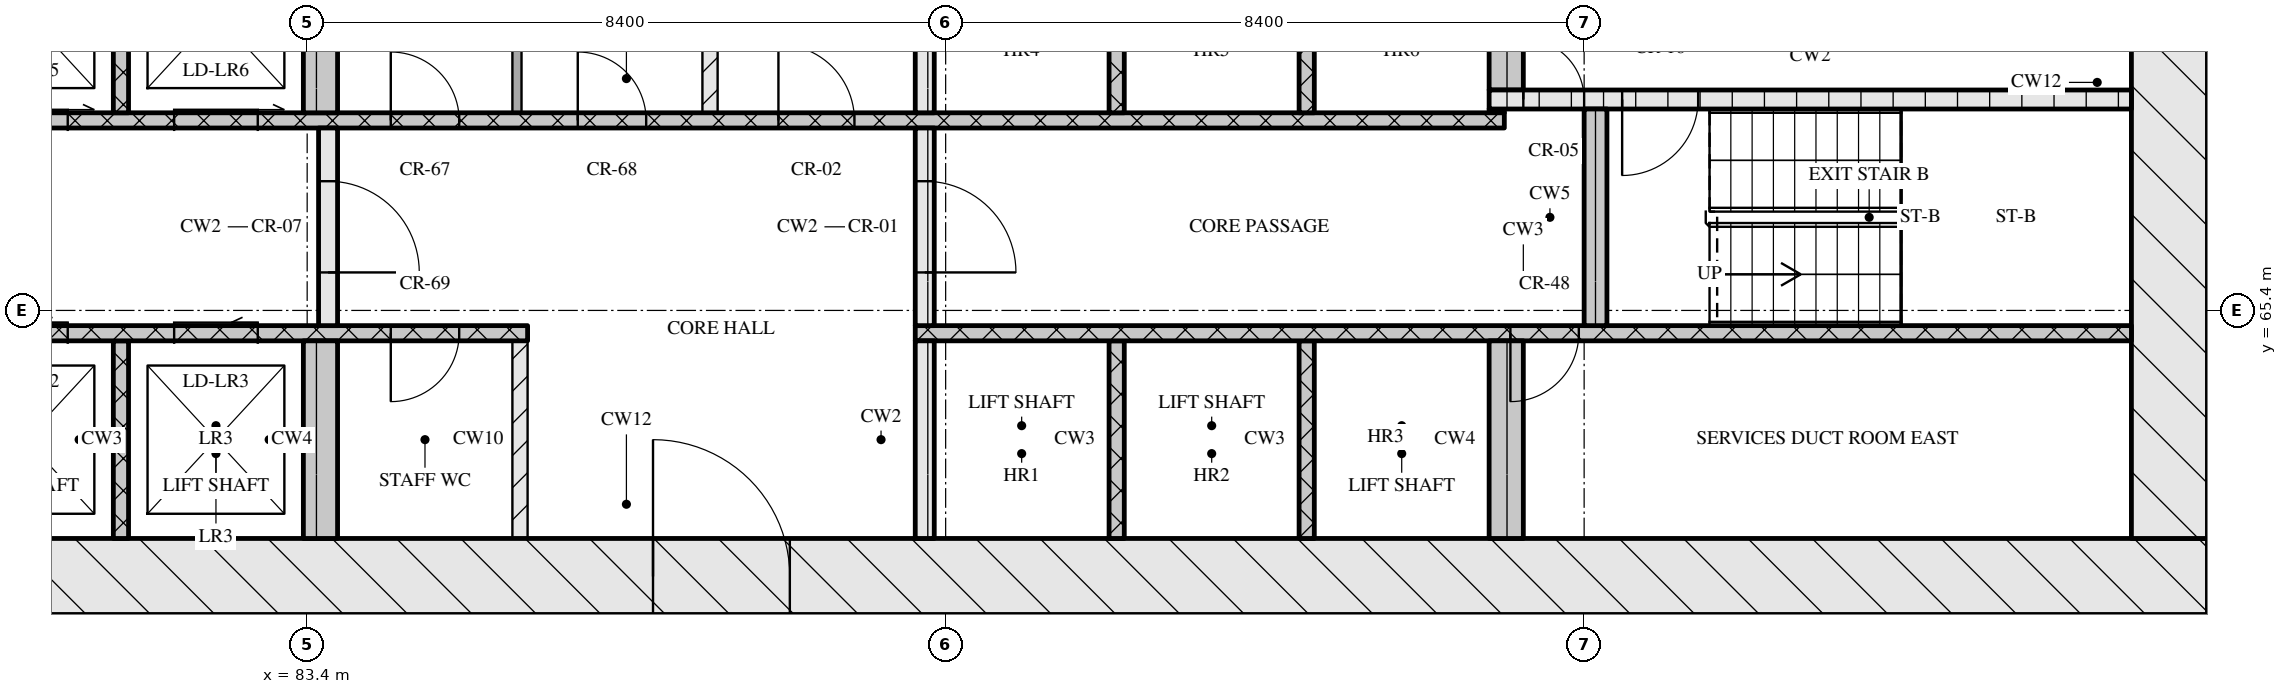
"""IFC4 building model, lengths in metres.
Left out: names, types, materials, properties, quantities, classifications, styles, units other than length and angle.
Written with IfcOpenShell. Run it as: python <this file> out.ifc"""

import sys

from ifc_helpers import new_model, si_unit, direction, frame, frame_2d, origin, place, context, subcontext, project, spatial, rectangle, extrude, element, fill, save


model = new_model("IFC4")
c1 = context("Model", 3, precision=1e-05, world=origin(), true_north=direction((0.0, 1.0)))
c2 = subcontext(c1, "Body", "Model", "MODEL_VIEW")
j1 = project(units=[si_unit("LENGTHUNIT", "METRE"), si_unit("PLANEANGLEUNIT", "RADIAN")], contexts=[c1])
p1 = place(None, origin())
s1 = spatial("IfcSite", under=j1, at=p1, CompositionType="ELEMENT")
p2 = place(p1, origin())
s2 = spatial("IfcBuilding", under=s1, at=p2, CompositionType="ELEMENT")
p3 = place(p2, frame((0.0, 0.0, 124.05)))
s3 = spatial("IfcBuildingStorey", under=s2, at=p3, CompositionType="ELEMENT", Elevation=124.05)
p4 = place(p3, frame((66.8, 61.9, 0.0), z_axis=(0.0, 0.0, 1.0), x_axis=(1.0, 0.0, 0.0)))
e1 = element("IfcWall", 1, at=p4, inside=s3, PredefinedType="SOLIDWALL", context=c2, shape_type="SweptSolid", body=[
    extrude(rectangle(XDim=41.6, YDim=1.0, at=frame_2d((20.8, 0.0))), origin(), (0.0, 0.0, 1.0), 3.32),
])
p5 = place(p4, frame((21.15, 0.0, 0.0)))
e2 = element("IfcOpeningElement", 2, at=p5, cuts=e1, PredefinedType="OPENING", context=c2, shape_type="SweptSolid", body=[
    extrude(rectangle(XDim=1.8, YDim=2.1, at=frame_2d((0.9, 1.05))), frame((0.0, 0.51, 0.0), z_axis=(0.0, -1.0, 0.0), x_axis=(1.0, 0.0, 0.0)), (0.0, 0.0, 1.0), 1.02),
])
p6 = place(p3, frame((107.9, 62.4, 0.0), z_axis=(0.0, 0.0, 1.0), x_axis=(0.0, 1.0, 0.0)))
e3 = element("IfcWall", 3, at=p6, inside=s3, PredefinedType="SOLIDWALL", context=c2, shape_type="SweptSolid", body=[
    extrude(rectangle(XDim=12.0, YDim=1.0, at=frame_2d((6.0, 0.0))), origin(), (0.0, 0.0, 1.0), 3.32),
])
p7 = place(p6, frame((6.45, 0.0, 0.0)))
e4 = element("IfcOpeningElement", 4, at=p7, cuts=e3, PredefinedType="OPENING", context=c2, shape_type="SweptSolid", body=[
    extrude(rectangle(XDim=1.2, YDim=2.1, at=frame_2d((0.6, 1.05))), frame((0.0, 0.51, 0.0), z_axis=(0.0, -1.0, 0.0), x_axis=(1.0, 0.0, 0.0)), (0.0, 0.0, 1.0), 1.02),
])
p8 = place(p3, frame((80.95, 62.4, 0.0), z_axis=(0.0, 0.0, 1.0), x_axis=(0.0, 1.0, 0.0)))
e5 = element("IfcWall", 5, at=p8, inside=s3, PredefinedType="SOLIDWALL", context=c2, shape_type="SweptSolid", body=[
    extrude(rectangle(XDim=2.6, YDim=0.2, at=frame_2d((1.3, 0.0))), origin(), (0.0, 0.0, 1.0), 3.32),
])
p9 = place(p3, frame((83.575, 62.4, 0.0), z_axis=(0.0, 0.0, 1.0), x_axis=(0.0, 1.0, 0.0)))
e6 = element("IfcWall", 6, at=p9, inside=s3, PredefinedType="SOLIDWALL", context=c2, shape_type="SweptSolid", body=[
    extrude(rectangle(XDim=2.6, YDim=0.45, at=frame_2d((1.3, 0.0))), origin(), (0.0, 0.0, 1.0), 3.32),
])
p10 = place(p3, frame((86.2, 62.4, 0.0), z_axis=(0.0, 0.0, 1.0), x_axis=(0.0, 1.0, 0.0)))
e7 = element("IfcWall", 7, at=p10, inside=s3, PredefinedType="PARTITIONING", context=c2, shape_type="SweptSolid", body=[
    extrude(rectangle(XDim=2.6, YDim=0.2, at=frame_2d((1.3, 0.0))), origin(), (0.0, 0.0, 1.0), 3.32),
])
p11 = place(p3, frame((91.525, 62.4, 0.0), z_axis=(0.0, 0.0, 1.0), x_axis=(0.0, 1.0, 0.0)))
e8 = element("IfcWall", 8, at=p11, inside=s3, PredefinedType="SOLIDWALL", context=c2, shape_type="SweptSolid", body=[
    extrude(rectangle(XDim=2.6, YDim=0.25, at=frame_2d((1.3, 0.0))), origin(), (0.0, 0.0, 1.0), 3.32),
])
for number, where, z_axis, x_axis in (
    (9, (94.05, 62.4, 0.0), (0.0, 0.0, 1.0), (0.0, 1.0, 0.0)),
    (10, (96.55, 62.4, 0.0), (0.0, 0.0, 1.0), (0.0, 1.0, 0.0)),
):
    element("IfcWall", number, at=place(p3, frame(where, z_axis=z_axis, x_axis=x_axis)), inside=s3, PredefinedType="SOLIDWALL", context=c2, shape_type="SweptSolid", body=[
        extrude(rectangle(XDim=2.6, YDim=0.2, at=frame_2d((1.3, 0.0))), origin(), (0.0, 0.0, 1.0), 3.32),
    ])
p12 = place(p3, frame((99.175, 62.4, 0.0), z_axis=(0.0, 0.0, 1.0), x_axis=(0.0, 1.0, 0.0)))
e11 = element("IfcWall", 11, at=p12, inside=s3, PredefinedType="SOLIDWALL", context=c2, shape_type="SweptSolid", body=[
    extrude(rectangle(XDim=2.6, YDim=0.45, at=frame_2d((1.3, 0.0))), origin(), (0.0, 0.0, 1.0), 3.32),
])
p13 = place(p3, frame((67.8, 65.1, 0.0), z_axis=(0.0, 0.0, 1.0), x_axis=(1.0, 0.0, 0.0)))
e12 = element("IfcWall", 12, at=p13, inside=s3, PredefinedType="SOLIDWALL", context=c2, shape_type="SweptSolid", body=[
    extrude(rectangle(XDim=18.5, YDim=0.2, at=frame_2d((9.25, 0.0))), origin(), (0.0, 0.0, 1.0), 3.32),
])
p14 = place(p13, frame((7.27, 0.0, 0.0)))
e13 = element("IfcOpeningElement", 13, at=p14, cuts=e12, PredefinedType="OPENING", context=c2, shape_type="SweptSolid", body=[
    extrude(rectangle(XDim=0.9, YDim=2.1, at=frame_2d((0.45, 1.05))), frame((0.0, 0.11, 0.0), z_axis=(0.0, -1.0, 0.0), x_axis=(1.0, 0.0, 0.0)), (0.0, 0.0, 1.0), 0.22),
])
p15 = place(p13, frame((8.85, 0.0, 0.0)))
e14 = element("IfcOpeningElement", 14, at=p15, cuts=e12, PredefinedType="OPENING", context=c2, shape_type="SweptSolid", body=[
    extrude(rectangle(XDim=1.1, YDim=2.1, at=frame_2d((0.55, 1.05))), frame((0.0, 0.11, 0.0), z_axis=(0.0, -1.0, 0.0), x_axis=(1.0, 0.0, 0.0)), (0.0, 0.0, 1.0), 0.22),
])
p16 = place(p13, frame((11.35, 0.0, 0.0)))
e15 = element("IfcOpeningElement", 15, at=p16, cuts=e12, PredefinedType="OPENING", context=c2, shape_type="SweptSolid", body=[
    extrude(rectangle(XDim=1.1, YDim=2.1, at=frame_2d((0.55, 1.05))), frame((0.0, 0.11, 0.0), z_axis=(0.0, -1.0, 0.0), x_axis=(1.0, 0.0, 0.0)), (0.0, 0.0, 1.0), 0.22),
])
p17 = place(p13, frame((13.85, 0.0, 0.0)))
e16 = element("IfcOpeningElement", 16, at=p17, cuts=e12, PredefinedType="OPENING", context=c2, shape_type="SweptSolid", body=[
    extrude(rectangle(XDim=1.1, YDim=2.1, at=frame_2d((0.55, 1.05))), frame((0.0, 0.11, 0.0), z_axis=(0.0, -1.0, 0.0), x_axis=(1.0, 0.0, 0.0)), (0.0, 0.0, 1.0), 0.22),
])
p18 = place(p13, frame((16.7, 0.0, 0.0)))
e17 = element("IfcOpeningElement", 17, at=p18, cuts=e12, PredefinedType="OPENING", context=c2, shape_type="SweptSolid", body=[
    extrude(rectangle(XDim=0.9, YDim=2.1, at=frame_2d((0.45, 1.05))), frame((0.0, 0.11, 0.0), z_axis=(0.0, -1.0, 0.0), x_axis=(1.0, 0.0, 0.0)), (0.0, 0.0, 1.0), 0.22),
])
p19 = place(p3, frame((91.4, 65.1, 0.0), z_axis=(0.0, 0.0, 1.0), x_axis=(1.0, 0.0, 0.0)))
e18 = element("IfcWall", 18, at=p19, inside=s3, PredefinedType="SOLIDWALL", context=c2, shape_type="SweptSolid", body=[
    extrude(rectangle(XDim=16.0, YDim=0.2, at=frame_2d((8.0, 0.0))), origin(), (0.0, 0.0, 1.0), 3.32),
])
p20 = place(p19, frame((7.83, 0.0, 0.0)))
e19 = element("IfcOpeningElement", 19, at=p20, cuts=e18, PredefinedType="OPENING", context=c2, shape_type="SweptSolid", body=[
    extrude(rectangle(XDim=0.9, YDim=2.1, at=frame_2d((0.45, 1.05))), frame((0.0, 0.11, 0.0), z_axis=(0.0, -1.0, 0.0), x_axis=(1.0, 0.0, 0.0)), (0.0, 0.0, 1.0), 0.22),
])
p21 = place(p3, frame((83.675, 65.2, 0.0), z_axis=(0.0, 0.0, 1.0), x_axis=(0.0, 1.0, 0.0)))
e20 = element("IfcWall", 20, at=p21, inside=s3, PredefinedType="SOLIDWALL", context=c2, shape_type="SweptSolid", body=[
    extrude(rectangle(XDim=2.6, YDim=0.25, at=frame_2d((1.3, 0.0))), origin(), (0.0, 0.0, 1.0), 3.32),
])
p22 = place(p21, frame((0.7, 0.0, 0.0)))
e21 = element("IfcOpeningElement", 21, at=p22, cuts=e20, PredefinedType="OPENING", context=c2, shape_type="SweptSolid", body=[
    extrude(rectangle(XDim=1.2, YDim=2.1, at=frame_2d((0.6, 1.05))), frame((0.0, 0.135, 0.0), z_axis=(0.0, -1.0, 0.0), x_axis=(1.0, 0.0, 0.0)), (0.0, 0.0, 1.0), 0.27),
])
p23 = place(p3, frame((91.525, 65.2, 0.0), z_axis=(0.0, 0.0, 1.0), x_axis=(0.0, 1.0, 0.0)))
e22 = element("IfcWall", 22, at=p23, inside=s3, PredefinedType="SOLIDWALL", context=c2, shape_type="SweptSolid", body=[
    extrude(rectangle(XDim=2.6, YDim=0.25, at=frame_2d((1.3, 0.0))), origin(), (0.0, 0.0, 1.0), 3.32),
])
p24 = place(p23, frame((0.7, 0.0, 0.0)))
e23 = element("IfcOpeningElement", 23, at=p24, cuts=e22, PredefinedType="OPENING", context=c2, shape_type="SweptSolid", body=[
    extrude(rectangle(XDim=1.2, YDim=2.1, at=frame_2d((0.6, 1.05))), frame((0.0, 0.135, 0.0), z_axis=(0.0, -1.0, 0.0), x_axis=(1.0, 0.0, 0.0)), (0.0, 0.0, 1.0), 0.27),
])
p25 = place(p3, frame((100.35, 65.2, 0.0), z_axis=(0.0, 0.0, 1.0), x_axis=(0.0, 1.0, 0.0)))
e24 = element("IfcWall", 24, at=p25, inside=s3, PredefinedType="SOLIDWALL", context=c2, shape_type="SweptSolid", body=[
    extrude(rectangle(XDim=2.85, YDim=0.3, at=frame_2d((1.425, 0.0))), origin(), (0.0, 0.0, 1.0), 3.32),
])
p26 = place(p3, frame((76.05, 67.9, 0.0), z_axis=(0.0, 0.0, 1.0), x_axis=(1.0, 0.0, 0.0)))
e25 = element("IfcWall", 25, at=p26, inside=s3, PredefinedType="SOLIDWALL", context=c2, shape_type="SweptSolid", body=[
    extrude(rectangle(XDim=23.1, YDim=0.2, at=frame_2d((11.55, 0.0))), origin(), (0.0, 0.0, 1.0), 3.32),
])
p27 = place(p26, frame((0.6, 0.0, 0.0)))
e26 = element("IfcOpeningElement", 26, at=p27, cuts=e25, PredefinedType="OPENING", context=c2, shape_type="SweptSolid", body=[
    extrude(rectangle(XDim=1.1, YDim=2.1, at=frame_2d((0.55, 1.05))), frame((0.0, 0.11, 0.0), z_axis=(0.0, -1.0, 0.0), x_axis=(1.0, 0.0, 0.0)), (0.0, 0.0, 1.0), 0.22),
])
p28 = place(p26, frame((3.1, 0.0, 0.0)))
e27 = element("IfcOpeningElement", 27, at=p28, cuts=e25, PredefinedType="OPENING", context=c2, shape_type="SweptSolid", body=[
    extrude(rectangle(XDim=1.1, YDim=2.1, at=frame_2d((0.55, 1.05))), frame((0.0, 0.11, 0.0), z_axis=(0.0, -1.0, 0.0), x_axis=(1.0, 0.0, 0.0)), (0.0, 0.0, 1.0), 0.22),
])
p29 = place(p26, frame((5.6, 0.0, 0.0)))
e28 = element("IfcOpeningElement", 28, at=p29, cuts=e25, PredefinedType="OPENING", context=c2, shape_type="SweptSolid", body=[
    extrude(rectangle(XDim=1.1, YDim=2.1, at=frame_2d((0.55, 1.05))), frame((0.0, 0.11, 0.0), z_axis=(0.0, -1.0, 0.0), x_axis=(1.0, 0.0, 0.0)), (0.0, 0.0, 1.0), 0.22),
])
p30 = place(p26, frame((8.45, 0.0, 0.0)))
e29 = element("IfcOpeningElement", 29, at=p30, cuts=e25, PredefinedType="OPENING", context=c2, shape_type="SweptSolid", body=[
    extrude(rectangle(XDim=0.9, YDim=2.1, at=frame_2d((0.45, 1.05))), frame((0.0, 0.11, 0.0), z_axis=(0.0, -1.0, 0.0), x_axis=(1.0, 0.0, 0.0)), (0.0, 0.0, 1.0), 0.22),
])
p31 = place(p26, frame((10.91, 0.0, 0.0)))
e30 = element("IfcOpeningElement", 30, at=p31, cuts=e25, PredefinedType="OPENING", context=c2, shape_type="SweptSolid", body=[
    extrude(rectangle(XDim=0.9, YDim=2.1, at=frame_2d((0.45, 1.05))), frame((0.0, 0.11, 0.0), z_axis=(0.0, -1.0, 0.0), x_axis=(1.0, 0.0, 0.0)), (0.0, 0.0, 1.0), 0.22),
])
p32 = place(p26, frame((13.55, 0.0, 0.0)))
e31 = element("IfcOpeningElement", 31, at=p32, cuts=e25, PredefinedType="OPENING", context=c2, shape_type="SweptSolid", body=[
    extrude(rectangle(XDim=1.0, YDim=2.1, at=frame_2d((0.5, 1.05))), frame((0.0, 0.11, 0.0), z_axis=(0.0, -1.0, 0.0), x_axis=(1.0, 0.0, 0.0)), (0.0, 0.0, 1.0), 0.22),
])
p33 = place(p3, frame((80.95, 68.0, 0.0), z_axis=(0.0, 0.0, 1.0), x_axis=(0.0, 1.0, 0.0)))
e32 = element("IfcWall", 32, at=p33, inside=s3, PredefinedType="SOLIDWALL", context=c2, shape_type="SweptSolid", body=[
    extrude(rectangle(XDim=2.6, YDim=0.2, at=frame_2d((1.3, 0.0))), origin(), (0.0, 0.0, 1.0), 3.32),
])
p34 = place(p3, frame((83.575, 68.0, 0.0), z_axis=(0.0, 0.0, 1.0), x_axis=(0.0, 1.0, 0.0)))
e33 = element("IfcWall", 33, at=p34, inside=s3, PredefinedType="SOLIDWALL", context=c2, shape_type="SweptSolid", body=[
    extrude(rectangle(XDim=2.6, YDim=0.45, at=frame_2d((1.3, 0.0))), origin(), (0.0, 0.0, 1.0), 3.32),
])
p35 = place(p3, frame((86.16, 68.0, 0.0), z_axis=(0.0, 0.0, 1.0), x_axis=(0.0, 1.0, 0.0)))
e34 = element("IfcWall", 34, at=p35, inside=s3, PredefinedType="PARTITIONING", context=c2, shape_type="SweptSolid", body=[
    extrude(rectangle(XDim=2.6, YDim=0.12, at=frame_2d((1.3, 0.0))), origin(), (0.0, 0.0, 1.0), 3.32),
])
p36 = place(p3, frame((88.7, 68.0, 0.0), z_axis=(0.0, 0.0, 1.0), x_axis=(0.0, 1.0, 0.0)))
e35 = element("IfcWall", 35, at=p36, inside=s3, PredefinedType="PARTITIONING", context=c2, shape_type="SweptSolid", body=[
    extrude(rectangle(XDim=2.6, YDim=0.2, at=frame_2d((1.3, 0.0))), origin(), (0.0, 0.0, 1.0), 3.32),
])
p37 = place(p3, frame((91.525, 68.0, 0.0), z_axis=(0.0, 0.0, 1.0), x_axis=(0.0, 1.0, 0.0)))
e36 = element("IfcWall", 36, at=p37, inside=s3, PredefinedType="SOLIDWALL", context=c2, shape_type="SweptSolid", body=[
    extrude(rectangle(XDim=2.6, YDim=0.25, at=frame_2d((1.3, 0.0))), origin(), (0.0, 0.0, 1.0), 3.32),
])
for number, where, z_axis, x_axis in (
    (37, (94.05, 68.0, 0.0), (0.0, 0.0, 1.0), (0.0, 1.0, 0.0)),
    (38, (96.55, 68.0, 0.0), (0.0, 0.0, 1.0), (0.0, 1.0, 0.0)),
):
    element("IfcWall", number, at=place(p3, frame(where, z_axis=z_axis, x_axis=x_axis)), inside=s3, PredefinedType="SOLIDWALL", context=c2, shape_type="SweptSolid", body=[
        extrude(rectangle(XDim=2.6, YDim=0.2, at=frame_2d((1.3, 0.0))), origin(), (0.0, 0.0, 1.0), 3.32),
    ])
p38 = place(p3, frame((98.95, 68.025, 0.0), z_axis=(0.0, 0.0, 1.0), x_axis=(1.0, 0.0, 0.0)))
e39 = element("IfcWall", 39, at=p38, inside=s3, PredefinedType="SOLIDWALL", context=c2, shape_type="SweptSolid", body=[
    extrude(rectangle(XDim=0.2, YDim=0.05, at=frame_2d((0.1, 0.0))), origin(), (0.0, 0.0, 1.0), 3.32),
])
p39 = place(p3, frame((98.95, 68.175, 0.0), z_axis=(0.0, 0.0, 1.0), x_axis=(1.0, 0.0, 0.0)))
e40 = element("IfcWall", 40, at=p39, inside=s3, PredefinedType="SOLIDWALL", context=c2, shape_type="SweptSolid", body=[
    extrude(rectangle(XDim=8.45, YDim=0.25, at=frame_2d((4.225, 0.0))), origin(), (0.0, 0.0, 1.0), 3.32),
])
p40 = place(p39, frame((0.45, 0.0, 0.0)))
e41 = element("IfcOpeningElement", 41, at=p40, cuts=e40, PredefinedType="OPENING", context=c2, shape_type="SweptSolid", body=[
    extrude(rectangle(XDim=0.8, YDim=2.1, at=frame_2d((0.4, 1.05))), frame((0.0, 0.135, 0.0), z_axis=(0.0, -1.0, 0.0), x_axis=(1.0, 0.0, 0.0)), (0.0, 0.0, 1.0), 0.27),
])
p41 = place(p39, frame((1.75, 0.0, 0.0)))
e42 = element("IfcOpeningElement", 42, at=p41, cuts=e40, PredefinedType="OPENING", context=c2, shape_type="SweptSolid", body=[
    extrude(rectangle(XDim=1.0, YDim=2.1, at=frame_2d((0.5, 1.05))), frame((0.0, 0.135, 0.0), z_axis=(0.0, -1.0, 0.0), x_axis=(1.0, 0.0, 0.0)), (0.0, 0.0, 1.0), 0.27),
])
p42 = place(p3, frame((99.175, 68.3, 0.0), z_axis=(0.0, 0.0, 1.0), x_axis=(0.0, 1.0, 0.0)))
e43 = element("IfcWall", 43, at=p42, inside=s3, PredefinedType="SOLIDWALL", context=c2, shape_type="SweptSolid", body=[
    extrude(rectangle(XDim=2.3, YDim=0.45, at=frame_2d((1.15, 0.0))), origin(), (0.0, 0.0, 1.0), 3.32),
])
p43 = place(p5, origin())
e44 = element("IfcDoor", 44, at=p43, inside=s3, OperationType="DOUBLE_DOOR_SINGLE_SWING", PredefinedType="DOOR", context=c2, shape_type="SweptSolid", body=[
    extrude(rectangle(XDim=1.8, YDim=2.1, at=frame_2d((0.9, 1.05))), frame((0.0, 0.025, 0.0), z_axis=(0.0, -1.0, 0.0), x_axis=(1.0, 0.0, 0.0)), (0.0, 0.0, 1.0), 0.05),
])
fill(e2, e44)
p44 = place(p16, origin())
e45 = element("IfcDoor", 45, at=p44, inside=s3, OperationType="SLIDING_TO_LEFT", PredefinedType="DOOR", context=c2, shape_type="SweptSolid", body=[
    extrude(rectangle(XDim=1.1, YDim=2.1, at=frame_2d((0.55, 1.05))), frame((0.0, 0.025, 0.0), z_axis=(0.0, -1.0, 0.0), x_axis=(1.0, 0.0, 0.0)), (0.0, 0.0, 1.0), 0.05),
])
fill(e15, e45)
p45 = place(p17, origin())
e46 = element("IfcDoor", 46, at=p45, inside=s3, OperationType="SLIDING_TO_LEFT", PredefinedType="DOOR", context=c2, shape_type="SweptSolid", body=[
    extrude(rectangle(XDim=1.1, YDim=2.1, at=frame_2d((0.55, 1.05))), frame((0.0, 0.025, 0.0), z_axis=(0.0, -1.0, 0.0), x_axis=(1.0, 0.0, 0.0)), (0.0, 0.0, 1.0), 0.05),
])
fill(e16, e46)
p46 = place(p18, origin())
e47 = element("IfcDoor", 47, at=p46, inside=s3, OperationType="SINGLE_SWING_RIGHT", PredefinedType="DOOR", context=c2, shape_type="SweptSolid", body=[
    extrude(rectangle(XDim=0.9, YDim=2.1, at=frame_2d((0.45, 1.05))), frame((0.0, 0.025, 0.0), z_axis=(0.0, -1.0, 0.0), x_axis=(1.0, 0.0, 0.0)), (0.0, 0.0, 1.0), 0.05),
])
fill(e17, e47)
p47 = place(p20, origin())
e48 = element("IfcDoor", 48, at=p47, inside=s3, OperationType="SINGLE_SWING_RIGHT", PredefinedType="DOOR", context=c2, shape_type="SweptSolid", body=[
    extrude(rectangle(XDim=0.9, YDim=2.1, at=frame_2d((0.45, 1.05))), frame((0.0, 0.025, 0.0), z_axis=(0.0, -1.0, 0.0), x_axis=(1.0, 0.0, 0.0)), (0.0, 0.0, 1.0), 0.05),
])
fill(e19, e48)
p48 = place(p22, origin())
e49 = element("IfcDoor", 49, at=p48, inside=s3, OperationType="SINGLE_SWING_RIGHT", PredefinedType="DOOR", context=c2, shape_type="SweptSolid", body=[
    extrude(rectangle(XDim=1.2, YDim=2.1, at=frame_2d((0.6, 1.05))), frame((0.0, 0.025, 0.0), z_axis=(0.0, -1.0, 0.0), x_axis=(1.0, 0.0, 0.0)), (0.0, 0.0, 1.0), 0.05),
])
fill(e21, e49)
p49 = place(p24, origin())
e50 = element("IfcDoor", 50, at=p49, inside=s3, OperationType="SINGLE_SWING_RIGHT", PredefinedType="DOOR", context=c2, shape_type="SweptSolid", body=[
    extrude(rectangle(XDim=1.2, YDim=2.1, at=frame_2d((0.6, 1.05))), frame((0.0, 0.025, 0.0), z_axis=(0.0, -1.0, 0.0), x_axis=(1.0, 0.0, 0.0)), (0.0, 0.0, 1.0), 0.05),
])
fill(e23, e50)
p50 = place(p28, origin())
e51 = element("IfcDoor", 51, at=p50, inside=s3, OperationType="SLIDING_TO_RIGHT", PredefinedType="DOOR", context=c2, shape_type="SweptSolid", body=[
    extrude(rectangle(XDim=1.1, YDim=2.1, at=frame_2d((0.55, 1.05))), frame((0.0, 0.025, 0.0), z_axis=(0.0, -1.0, 0.0), x_axis=(1.0, 0.0, 0.0)), (0.0, 0.0, 1.0), 0.05),
])
fill(e27, e51)
p51 = place(p29, origin())
e52 = element("IfcDoor", 52, at=p51, inside=s3, OperationType="SLIDING_TO_RIGHT", PredefinedType="DOOR", context=c2, shape_type="SweptSolid", body=[
    extrude(rectangle(XDim=1.1, YDim=2.1, at=frame_2d((0.55, 1.05))), frame((0.0, 0.025, 0.0), z_axis=(0.0, -1.0, 0.0), x_axis=(1.0, 0.0, 0.0)), (0.0, 0.0, 1.0), 0.05),
])
fill(e28, e52)
p52 = place(p30, origin())
e53 = element("IfcDoor", 53, at=p52, inside=s3, OperationType="SINGLE_SWING_LEFT", PredefinedType="DOOR", context=c2, shape_type="SweptSolid", body=[
    extrude(rectangle(XDim=0.9, YDim=2.1, at=frame_2d((0.45, 1.05))), frame((0.0, 0.025, 0.0), z_axis=(0.0, -1.0, 0.0), x_axis=(1.0, 0.0, 0.0)), (0.0, 0.0, 1.0), 0.05),
])
fill(e29, e53)
p53 = place(p31, origin())
e54 = element("IfcDoor", 54, at=p53, inside=s3, OperationType="SINGLE_SWING_LEFT", PredefinedType="DOOR", context=c2, shape_type="SweptSolid", body=[
    extrude(rectangle(XDim=0.9, YDim=2.1, at=frame_2d((0.45, 1.05))), frame((0.0, 0.025, 0.0), z_axis=(0.0, -1.0, 0.0), x_axis=(1.0, 0.0, 0.0)), (0.0, 0.0, 1.0), 0.05),
])
fill(e30, e54)
p54 = place(p32, origin())
e55 = element("IfcDoor", 55, at=p54, inside=s3, OperationType="SINGLE_SWING_LEFT", PredefinedType="DOOR", context=c2, shape_type="SweptSolid", body=[
    extrude(rectangle(XDim=1.0, YDim=2.1, at=frame_2d((0.5, 1.05))), frame((0.0, 0.025, 0.0), z_axis=(0.0, -1.0, 0.0), x_axis=(1.0, 0.0, 0.0)), (0.0, 0.0, 1.0), 0.05),
])
fill(e31, e55)
p55 = place(p40, origin())
e56 = element("IfcDoor", 56, at=p55, inside=s3, OperationType="SINGLE_SWING_LEFT", PredefinedType="DOOR", context=c2, shape_type="SweptSolid", body=[
    extrude(rectangle(XDim=0.8, YDim=2.1, at=frame_2d((0.4, 1.05))), frame((0.0, 0.025, 0.0), z_axis=(0.0, -1.0, 0.0), x_axis=(1.0, 0.0, 0.0)), (0.0, 0.0, 1.0), 0.05),
])
fill(e41, e56)
p56 = place(p41, origin())
e57 = element("IfcDoor", 57, at=p56, inside=s3, OperationType="SINGLE_SWING_RIGHT", PredefinedType="DOOR", context=c2, shape_type="SweptSolid", body=[
    extrude(rectangle(XDim=1.0, YDim=2.1, at=frame_2d((0.5, 1.05))), frame((0.0, 0.025, 0.0), z_axis=(0.0, -1.0, 0.0), x_axis=(1.0, 0.0, 0.0)), (0.0, 0.0, 1.0), 0.05),
])
fill(e42, e57)
save(model, sys.argv[1])
